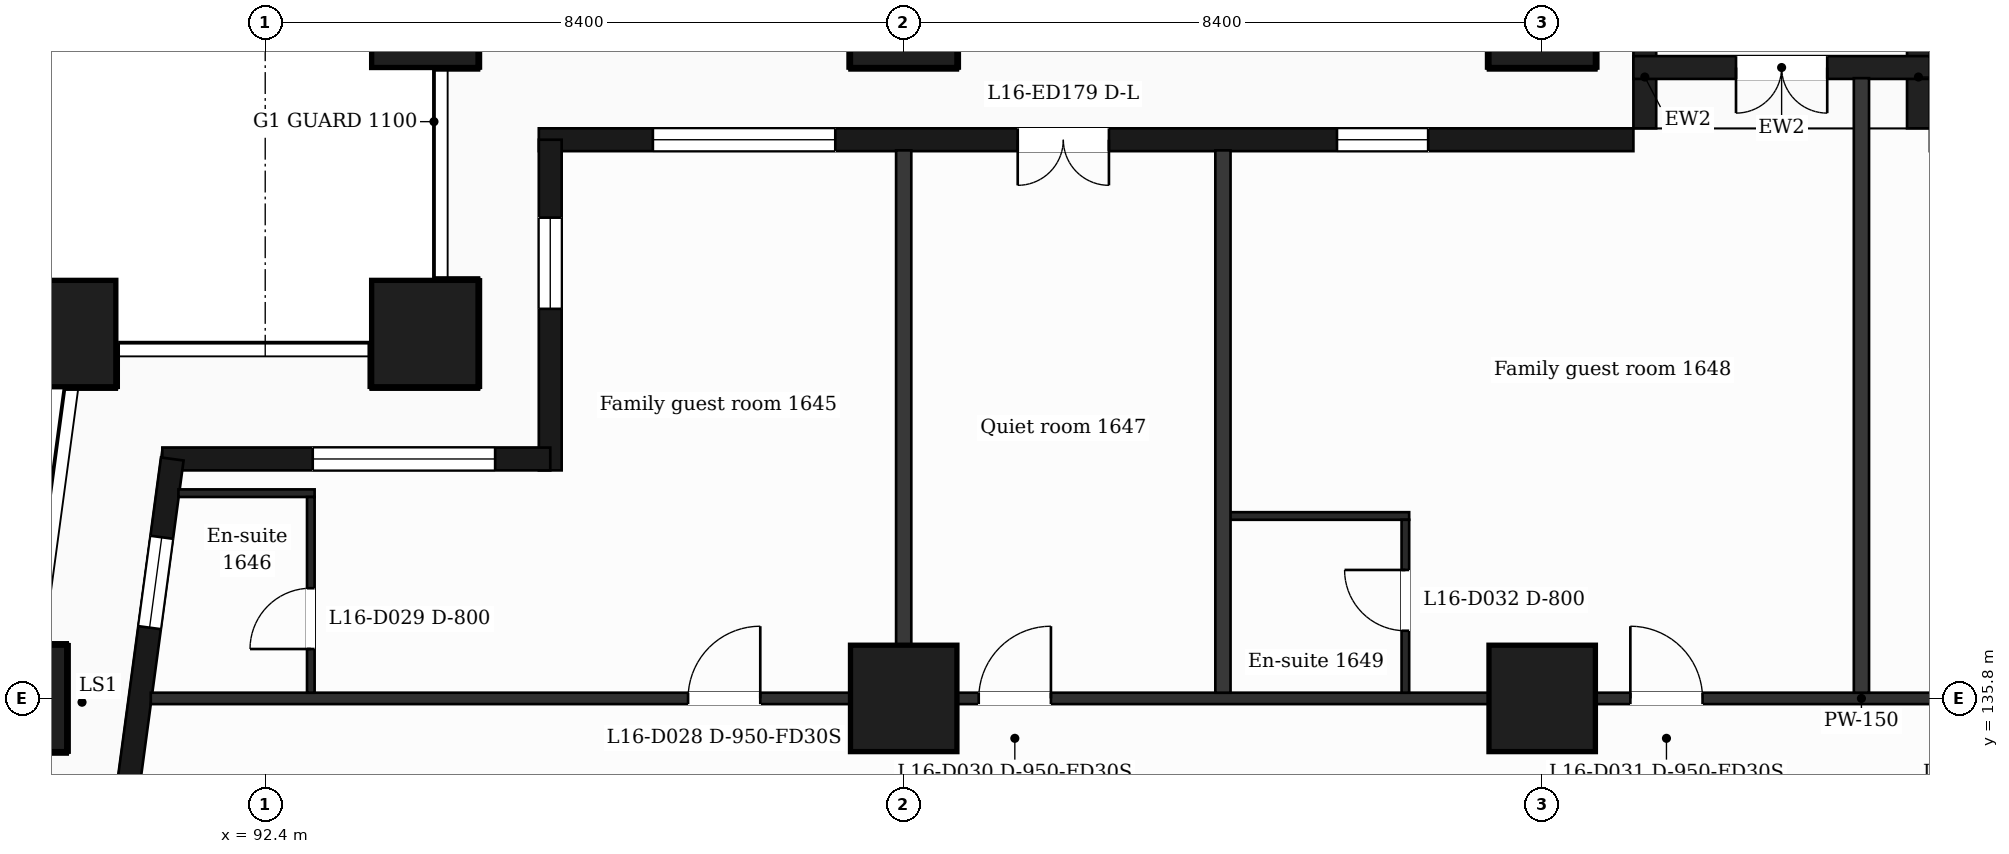
"""IFC4 building model, lengths in metres.
Left out: names, types, materials, properties, quantities, classifications, styles, units other than length and angle.
Written with IfcOpenShell. Run it as: python <this file> out.ifc"""

import sys

from ifc_helpers import new_model, si_unit, direction, frame, frame_2d, origin, origin_2d, place, context, subcontext, project, spatial, rectangle, extrude, element, fill, save


model = new_model("IFC4")
c1 = context("Model", 3, precision=1e-05, world=origin(), true_north=direction((0.0, 1.0)))
c2 = subcontext(c1, "Body", "Model", "MODEL_VIEW")
j1 = project(units=[si_unit("LENGTHUNIT", "METRE"), si_unit("PLANEANGLEUNIT", "RADIAN")], contexts=[c1])
p1 = place(None, origin())
s1 = spatial("IfcSite", under=j1, at=p1, CompositionType="ELEMENT")
p2 = place(p1, origin())
s2 = spatial("IfcBuilding", under=s1, at=p2, CompositionType="ELEMENT")
p3 = place(p2, frame((0.0, 0.0, 74.0)))
s3 = spatial("IfcBuildingStorey", under=s2, at=p3, CompositionType="ELEMENT", Elevation=74.0)
for number, where, z_axis, x_axis in (
    (1, (94.5, 140.6, 0.0), (0.0, 0.0, 1.0), (1.0, 0.0, 0.0)),
    (2, (89.735, 140.6, 0.0), (0.0, 0.0, 1.0), (1.0, 0.0, 0.0)),
    (3, (100.8, 135.8, 0.0), (0.0, 0.0, 1.0), (1.0, 0.0, 0.0)),
    (4, (109.2, 135.8, 0.0), (0.0, 0.0, 1.0), (1.0, 0.0, 0.0)),
    (5, (89.088, 135.8, 0.0), (0.0, 0.0, 1.0), (1.0, 0.0, 0.0)),
    (6, (100.8, 144.8, 0.0), (0.0, 0.0, 1.0), (1.0, 0.0, 0.0)),
    (7, (109.2, 144.8, 0.0), (0.0, 0.0, 1.0), (1.0, 0.0, 0.0)),
    (8, (94.5, 144.8, 0.0), (0.0, 0.0, 1.0), (1.0, 0.0, 0.0)),
):
    element("IfcColumn", number, at=place(p3, frame(where, z_axis=z_axis, x_axis=x_axis)), inside=s3, PredefinedType="COLUMN", context=c2, shape_type="SweptSolid", body=[
        extrude(rectangle(XDim=1.4, YDim=1.4, at=origin_2d()), origin(), (0.0, 0.0, 1.0), 3.5),
    ])
p4 = place(p3, frame((110.4, 143.15, 0.0), z_axis=(0.0, 0.0, 1.0), x_axis=(-1.0, 0.0, 0.0)))
e9 = element("IfcWall", 9, at=p4, inside=s3, PredefinedType="SOLIDWALL", context=c2, shape_type="SweptSolid", body=[
    extrude(rectangle(XDim=14.4, YDim=0.3, at=frame_2d((7.2, 0.0))), origin(), (0.0, 0.0, 1.0), 3.18),
])
p5 = place(p4, frame((2.7, 0.0, 0.9)))
e10 = element("IfcOpeningElement", 10, at=p5, cuts=e9, PredefinedType="OPENING", context=c2, shape_type="SweptSolid", body=[
    extrude(rectangle(XDim=1.2, YDim=2.1, at=frame_2d((0.6, 1.05))), frame((0.0, 0.16, 0.0), z_axis=(0.0, -1.0, 0.0), x_axis=(1.0, 0.0, 0.0)), (0.0, 0.0, 1.0), 0.32),
])
p6 = place(p4, frame((6.9, 0.0, 0.0)))
e11 = element("IfcOpeningElement", 11, at=p6, cuts=e9, PredefinedType="OPENING", context=c2, shape_type="SweptSolid", body=[
    extrude(rectangle(XDim=1.2, YDim=2.4, at=frame_2d((0.6, 1.2))), frame((0.0, 0.16, 0.0), z_axis=(0.0, -1.0, 0.0), x_axis=(1.0, 0.0, 0.0)), (0.0, 0.0, 1.0), 0.32),
])
p7 = place(p4, frame((10.5, 0.0, 0.9)))
e12 = element("IfcOpeningElement", 12, at=p7, cuts=e9, PredefinedType="OPENING", context=c2, shape_type="SweptSolid", body=[
    extrude(rectangle(XDim=2.4, YDim=2.1, at=frame_2d((1.2, 1.05))), frame((0.0, 0.16, 0.0), z_axis=(0.0, -1.0, 0.0), x_axis=(1.0, 0.0, 0.0)), (0.0, 0.0, 1.0), 0.32),
])
for number, where, z_axis, x_axis in (
    (13, (114.15, 143.3, 0.0), (0.0, 0.0, 1.0), (0.0, 1.0, 0.0)),
    (14, (110.55, 143.3, 0.0), (0.0, 0.0, 1.0), (0.0, 1.0, 0.0)),
):
    element("IfcWall", number, at=place(p3, frame(where, z_axis=z_axis, x_axis=x_axis)), inside=s3, PredefinedType="SOLIDWALL", context=c2, shape_type="SweptSolid", body=[
        extrude(rectangle(XDim=1.35, YDim=0.3, at=frame_2d((0.675, 0.0))), origin(), (0.0, 0.0, 1.0), 3.18),
    ])
p8 = place(p3, frame((114.3, 144.1, 0.0), z_axis=(0.0, 0.0, 1.0), x_axis=(-1.0, 0.0, 0.0)))
e15 = element("IfcWall", 15, at=p8, inside=s3, PredefinedType="SOLIDWALL", context=c2, shape_type="SweptSolid", body=[
    extrude(rectangle(XDim=3.9, YDim=0.3, at=frame_2d((1.95, 0.0))), origin(), (0.0, 0.0, 1.0), 3.18),
])
p9 = place(p8, frame((1.35, 0.0, 0.0)))
e16 = element("IfcOpeningElement", 16, at=p9, cuts=e15, PredefinedType="OPENING", context=c2, shape_type="SweptSolid", body=[
    extrude(rectangle(XDim=1.2, YDim=2.4, at=frame_2d((0.6, 1.2))), frame((0.0, 0.16, 0.0), z_axis=(0.0, -1.0, 0.0), x_axis=(1.0, 0.0, 0.0)), (0.0, 0.0, 1.0), 0.32),
])
p10 = place(p3, frame((96.15, 143.15, 0.0), z_axis=(0.0, 0.0, 1.0), x_axis=(0.0, -1.0, 0.0)))
e17 = element("IfcWall", 17, at=p10, inside=s3, PredefinedType="SOLIDWALL", context=c2, shape_type="SweptSolid", body=[
    extrude(rectangle(XDim=4.35, YDim=0.3, at=frame_2d((2.175, 0.0))), origin(), (0.0, 0.0, 1.0), 3.18),
])
p11 = place(p10, frame((1.025, 0.0, 0.9)))
e18 = element("IfcOpeningElement", 18, at=p11, cuts=e17, PredefinedType="OPENING", context=c2, shape_type="SweptSolid", body=[
    extrude(rectangle(XDim=1.2, YDim=2.1, at=frame_2d((0.6, 1.05))), frame((0.0, 0.16, 0.0), z_axis=(0.0, -1.0, 0.0), x_axis=(1.0, 0.0, 0.0)), (0.0, 0.0, 1.0), 0.32),
])
p12 = place(p3, frame((96.15, 138.95, 0.0), z_axis=(0.0, 0.0, 1.0), x_axis=(-1.0, 0.0, 0.0)))
e19 = element("IfcWall", 19, at=p12, inside=s3, PredefinedType="SOLIDWALL", context=c2, shape_type="SweptSolid", body=[
    extrude(rectangle(XDim=5.104, YDim=0.3, at=frame_2d((2.552, 0.0))), origin(), (0.0, 0.0, 1.0), 3.18),
])
p13 = place(p12, frame((0.725, 0.0, 0.9)))
e20 = element("IfcOpeningElement", 20, at=p13, cuts=e19, PredefinedType="OPENING", context=c2, shape_type="SweptSolid", body=[
    extrude(rectangle(XDim=2.4, YDim=2.1, at=frame_2d((1.2, 1.05))), frame((0.0, 0.16, 0.0), z_axis=(0.0, -1.0, 0.0), x_axis=(1.0, 0.0, 0.0)), (0.0, 0.0, 1.0), 0.32),
])
p14 = place(p3, frame((91.177, 138.95, 0.0), z_axis=(0.0, 0.0, 1.0), x_axis=(-0.133426664613, -0.991058689065, 0.0)))
e21 = element("IfcWall", 21, at=p14, inside=s3, PredefinedType="SOLIDWALL", context=c2, shape_type="SweptSolid", body=[
    extrude(rectangle(XDim=6.609, YDim=0.3, at=frame_2d((3.305, 0.0))), origin(), (0.0, 0.0, 1.0), 3.18),
])
p15 = place(p14, frame((1.039, 0.0, 0.9)))
e22 = element("IfcOpeningElement", 22, at=p15, cuts=e21, PredefinedType="OPENING", context=c2, shape_type="SweptSolid", body=[
    extrude(rectangle(XDim=1.2, YDim=2.1, at=frame_2d((0.6, 1.05))), frame((0.0, 0.16, 0.0), z_axis=(0.0, -1.0, 0.0), x_axis=(1.0, 0.0, 0.0)), (0.0, 0.0, 1.0), 0.32),
])
p16 = place(p14, frame((4.294, 0.0, 0.0)))
e23 = element("IfcOpeningElement", 23, at=p16, cuts=e21, PredefinedType="OPENING", context=c2, shape_type="SweptSolid", body=[
    extrude(rectangle(XDim=1.2, YDim=2.4, at=frame_2d((0.6, 1.2))), frame((0.0, 0.16, 0.0), z_axis=(0.0, -1.0, 0.0), x_axis=(1.0, 0.0, 0.0)), (0.0, 0.0, 1.0), 0.32),
])
p17 = place(p3, frame((90.895, 135.8, 0.0), z_axis=(0.0, 0.0, 1.0), x_axis=(1.0, 0.0, 0.0)))
e24 = element("IfcWall", 24, at=p17, inside=s3, PredefinedType="PARTITIONING", context=c2, shape_type="SweptSolid", body=[
    extrude(rectangle(XDim=45.011, YDim=0.15, at=frame_2d((22.505, 0.0))), origin(), (0.0, 0.0, 1.0), 3.18),
])
p18 = place(p17, frame((7.068, 0.0, 0.0)))
e25 = element("IfcOpeningElement", 25, at=p18, cuts=e24, PredefinedType="OPENING", context=c2, shape_type="SweptSolid", body=[
    extrude(rectangle(XDim=0.95, YDim=2.1, at=frame_2d((0.475, 1.05))), frame((0.0, 0.085, 0.0), z_axis=(0.0, -1.0, 0.0), x_axis=(1.0, 0.0, 0.0)), (0.0, 0.0, 1.0), 0.17),
])
p19 = place(p17, frame((10.892, 0.0, 0.0)))
e26 = element("IfcOpeningElement", 26, at=p19, cuts=e24, PredefinedType="OPENING", context=c2, shape_type="SweptSolid", body=[
    extrude(rectangle(XDim=0.95, YDim=2.1, at=frame_2d((0.475, 1.05))), frame((0.0, 0.085, 0.0), z_axis=(0.0, -1.0, 0.0), x_axis=(1.0, 0.0, 0.0)), (0.0, 0.0, 1.0), 0.17),
])
p20 = place(p17, frame((19.465, 0.0, 0.0)))
e27 = element("IfcOpeningElement", 27, at=p20, cuts=e24, PredefinedType="OPENING", context=c2, shape_type="SweptSolid", body=[
    extrude(rectangle(XDim=0.95, YDim=2.1, at=frame_2d((0.475, 1.05))), frame((0.0, 0.085, 0.0), z_axis=(0.0, -1.0, 0.0), x_axis=(1.0, 0.0, 0.0)), (0.0, 0.0, 1.0), 0.17),
])
p21 = place(p17, frame((24.385, 0.0, 0.0)))
e28 = element("IfcOpeningElement", 28, at=p21, cuts=e24, PredefinedType="OPENING", context=c2, shape_type="SweptSolid", body=[
    extrude(rectangle(XDim=0.95, YDim=2.1, at=frame_2d((0.475, 1.05))), frame((0.0, 0.085, 0.0), z_axis=(0.0, -1.0, 0.0), x_axis=(1.0, 0.0, 0.0)), (0.0, 0.0, 1.0), 0.17),
])
p22 = place(p17, frame((30.767, 0.0, 0.0)))
e29 = element("IfcOpeningElement", 29, at=p22, cuts=e24, PredefinedType="OPENING", context=c2, shape_type="SweptSolid", body=[
    extrude(rectangle(XDim=0.95, YDim=2.1, at=frame_2d((0.475, 1.05))), frame((0.0, 0.085, 0.0), z_axis=(0.0, -1.0, 0.0), x_axis=(1.0, 0.0, 0.0)), (0.0, 0.0, 1.0), 0.17),
])
p23 = place(p17, frame((40.314, 0.0, 0.0)))
e30 = element("IfcOpeningElement", 30, at=p23, cuts=e24, PredefinedType="OPENING", context=c2, shape_type="SweptSolid", body=[
    extrude(rectangle(XDim=0.95, YDim=2.1, at=frame_2d((0.475, 1.05))), frame((0.0, 0.085, 0.0), z_axis=(0.0, -1.0, 0.0), x_axis=(1.0, 0.0, 0.0)), (0.0, 0.0, 1.0), 0.17),
])
p24 = place(p3, frame((105.0, 138.2, 0.0), z_axis=(0.0, 0.0, 1.0), x_axis=(1.0, 0.0, 0.0)))
e31 = element("IfcWall", 31, at=p24, inside=s3, PredefinedType="PARTITIONING", context=c2, shape_type="SweptSolid", body=[
    extrude(rectangle(XDim=2.45, YDim=0.1, at=frame_2d((1.225, 0.0))), origin(), (0.0, 0.0, 1.0), 3.18),
])
p25 = place(p3, frame((91.258, 138.5, 0.0), z_axis=(0.0, 0.0, 1.0), x_axis=(1.0, 0.0, 0.0)))
e32 = element("IfcWall", 32, at=p25, inside=s3, PredefinedType="PARTITIONING", context=c2, shape_type="SweptSolid", body=[
    extrude(rectangle(XDim=1.792, YDim=0.1, at=frame_2d((0.896, 0.0))), origin(), (0.0, 0.0, 1.0), 3.18),
])
p26 = place(p3, frame((93.0, 135.875, 0.0), z_axis=(0.0, 0.0, 1.0), x_axis=(0.0, 1.0, 0.0)))
e33 = element("IfcWall", 33, at=p26, inside=s3, PredefinedType="PARTITIONING", context=c2, shape_type="SweptSolid", body=[
    extrude(rectangle(XDim=2.575, YDim=0.1, at=frame_2d((1.288, 0.0))), origin(), (0.0, 0.0, 1.0), 3.18),
])
p27 = place(p26, frame((0.575, 0.0, 0.0)))
e34 = element("IfcOpeningElement", 34, at=p27, cuts=e33, PredefinedType="OPENING", context=c2, shape_type="SweptSolid", body=[
    extrude(rectangle(XDim=0.8, YDim=2.1, at=frame_2d((0.4, 1.05))), frame((0.0, 0.06, 0.0), z_axis=(0.0, -1.0, 0.0), x_axis=(1.0, 0.0, 0.0)), (0.0, 0.0, 1.0), 0.12),
])
for number, where, z_axis, x_axis in (
    (35, (100.8, 135.875, 0.0), (0.0, 0.0, 1.0), (0.0, 1.0, 0.0)),
    (36, (105.0, 135.875, 0.0), (0.0, 0.0, 1.0), (0.0, 1.0, 0.0)),
):
    element("IfcWall", number, at=place(p3, frame(where, z_axis=z_axis, x_axis=x_axis)), inside=s3, PredefinedType="PARTITIONING", context=c2, shape_type="SweptSolid", body=[
        extrude(rectangle(XDim=7.135, YDim=0.2, at=frame_2d((3.567, 0.0))), origin(), (0.0, 0.0, 1.0), 3.18),
    ])
p28 = place(p3, frame((107.4, 135.875, 0.0), z_axis=(0.0, 0.0, 1.0), x_axis=(0.0, 1.0, 0.0)))
e37 = element("IfcWall", 37, at=p28, inside=s3, PredefinedType="PARTITIONING", context=c2, shape_type="SweptSolid", body=[
    extrude(rectangle(XDim=2.275, YDim=0.1, at=frame_2d((1.137, 0.0))), origin(), (0.0, 0.0, 1.0), 3.18),
])
p29 = place(p28, frame((0.815, 0.0, 0.0)))
e38 = element("IfcOpeningElement", 38, at=p29, cuts=e37, PredefinedType="OPENING", context=c2, shape_type="SweptSolid", body=[
    extrude(rectangle(XDim=0.8, YDim=2.1, at=frame_2d((0.4, 1.05))), frame((0.0, 0.06, 0.0), z_axis=(0.0, -1.0, 0.0), x_axis=(1.0, 0.0, 0.0)), (0.0, 0.0, 1.0), 0.12),
])
p30 = place(p3, frame((113.4, 135.875, 0.0), z_axis=(0.0, 0.0, 1.0), x_axis=(0.0, 1.0, 0.0)))
e39 = element("IfcWall", 39, at=p30, inside=s3, PredefinedType="PARTITIONING", context=c2, shape_type="SweptSolid", body=[
    extrude(rectangle(XDim=8.085, YDim=0.2, at=frame_2d((4.042, 0.0))), origin(), (0.0, 0.0, 1.0), 3.18),
])
p31 = place(p5, origin())
e40 = element("IfcWindow", 40, at=p31, inside=s3, PartitioningType="SINGLE_PANEL", PredefinedType="WINDOW", context=c2, shape_type="SweptSolid", body=[
    extrude(rectangle(XDim=1.2, YDim=2.1, at=frame_2d((0.6, 1.05))), frame((0.0, 0.03, 0.0), z_axis=(0.0, -1.0, 0.0), x_axis=(1.0, 0.0, 0.0)), (0.0, 0.0, 1.0), 0.06),
])
fill(e10, e40)
p32 = place(p6, origin())
e41 = element("IfcDoor", 41, at=p32, inside=s3, OperationType="DOUBLE_DOOR_SINGLE_SWING", PredefinedType="DOOR", context=c2, shape_type="SweptSolid", body=[
    extrude(rectangle(XDim=1.2, YDim=2.4, at=frame_2d((0.6, 1.2))), frame((0.0, 0.025, 0.0), z_axis=(0.0, -1.0, 0.0), x_axis=(1.0, 0.0, 0.0)), (0.0, 0.0, 1.0), 0.05),
])
fill(e11, e41)
p33 = place(p7, origin())
e42 = element("IfcWindow", 42, at=p33, inside=s3, PartitioningType="SINGLE_PANEL", PredefinedType="WINDOW", context=c2, shape_type="SweptSolid", body=[
    extrude(rectangle(XDim=2.4, YDim=2.1, at=frame_2d((1.2, 1.05))), frame((0.0, 0.03, 0.0), z_axis=(0.0, -1.0, 0.0), x_axis=(1.0, 0.0, 0.0)), (0.0, 0.0, 1.0), 0.06),
])
fill(e12, e42)
p34 = place(p9, origin())
e43 = element("IfcDoor", 43, at=p34, inside=s3, OperationType="DOUBLE_DOOR_SINGLE_SWING", PredefinedType="DOOR", context=c2, shape_type="SweptSolid", body=[
    extrude(rectangle(XDim=1.2, YDim=2.4, at=frame_2d((0.6, 1.2))), frame((0.0, 0.025, 0.0), z_axis=(0.0, -1.0, 0.0), x_axis=(1.0, 0.0, 0.0)), (0.0, 0.0, 1.0), 0.05),
])
fill(e16, e43)
p35 = place(p11, origin())
e44 = element("IfcWindow", 44, at=p35, inside=s3, PartitioningType="SINGLE_PANEL", PredefinedType="WINDOW", context=c2, shape_type="SweptSolid", body=[
    extrude(rectangle(XDim=1.2, YDim=2.1, at=frame_2d((0.6, 1.05))), frame((0.0, 0.03, 0.0), z_axis=(0.0, -1.0, 0.0), x_axis=(1.0, 0.0, 0.0)), (0.0, 0.0, 1.0), 0.06),
])
fill(e18, e44)
p36 = place(p13, origin())
e45 = element("IfcWindow", 45, at=p36, inside=s3, PartitioningType="SINGLE_PANEL", PredefinedType="WINDOW", context=c2, shape_type="SweptSolid", body=[
    extrude(rectangle(XDim=2.4, YDim=2.1, at=frame_2d((1.2, 1.05))), frame((0.0, 0.03, 0.0), z_axis=(0.0, -1.0, 0.0), x_axis=(1.0, 0.0, 0.0)), (0.0, 0.0, 1.0), 0.06),
])
fill(e20, e45)
p37 = place(p15, origin())
e46 = element("IfcWindow", 46, at=p37, inside=s3, PartitioningType="SINGLE_PANEL", PredefinedType="WINDOW", context=c2, shape_type="SweptSolid", body=[
    extrude(rectangle(XDim=1.2, YDim=2.1, at=frame_2d((0.6, 1.05))), frame((0.0, 0.03, 0.0), z_axis=(0.0, -1.0, 0.0), x_axis=(1.0, 0.0, 0.0)), (0.0, 0.0, 1.0), 0.06),
])
fill(e22, e46)
p38 = place(p18, origin())
e47 = element("IfcDoor", 47, at=p38, inside=s3, OperationType="SINGLE_SWING_RIGHT", PredefinedType="DOOR", context=c2, shape_type="SweptSolid", body=[
    extrude(rectangle(XDim=0.95, YDim=2.1, at=frame_2d((0.475, 1.05))), frame((0.0, 0.025, 0.0), z_axis=(0.0, -1.0, 0.0), x_axis=(1.0, 0.0, 0.0)), (0.0, 0.0, 1.0), 0.05),
])
fill(e25, e47)
p39 = place(p27, origin())
e48 = element("IfcDoor", 48, at=p39, inside=s3, OperationType="SINGLE_SWING_LEFT", PredefinedType="DOOR", context=c2, shape_type="SweptSolid", body=[
    extrude(rectangle(XDim=0.8, YDim=2.1, at=frame_2d((0.4, 1.05))), frame((0.0, 0.025, 0.0), z_axis=(0.0, -1.0, 0.0), x_axis=(1.0, 0.0, 0.0)), (0.0, 0.0, 1.0), 0.05),
])
fill(e34, e48)
p40 = place(p19, origin())
e49 = element("IfcDoor", 49, at=p40, inside=s3, OperationType="SINGLE_SWING_RIGHT", PredefinedType="DOOR", context=c2, shape_type="SweptSolid", body=[
    extrude(rectangle(XDim=0.95, YDim=2.1, at=frame_2d((0.475, 1.05))), frame((0.0, 0.025, 0.0), z_axis=(0.0, -1.0, 0.0), x_axis=(1.0, 0.0, 0.0)), (0.0, 0.0, 1.0), 0.05),
])
fill(e26, e49)
p41 = place(p20, origin())
e50 = element("IfcDoor", 50, at=p41, inside=s3, OperationType="SINGLE_SWING_LEFT", PredefinedType="DOOR", context=c2, shape_type="SweptSolid", body=[
    extrude(rectangle(XDim=0.95, YDim=2.1, at=frame_2d((0.475, 1.05))), frame((0.0, 0.025, 0.0), z_axis=(0.0, -1.0, 0.0), x_axis=(1.0, 0.0, 0.0)), (0.0, 0.0, 1.0), 0.05),
])
fill(e27, e50)
p42 = place(p29, origin())
e51 = element("IfcDoor", 51, at=p42, inside=s3, OperationType="SINGLE_SWING_RIGHT", PredefinedType="DOOR", context=c2, shape_type="SweptSolid", body=[
    extrude(rectangle(XDim=0.8, YDim=2.1, at=frame_2d((0.4, 1.05))), frame((0.0, 0.025, 0.0), z_axis=(0.0, -1.0, 0.0), x_axis=(1.0, 0.0, 0.0)), (0.0, 0.0, 1.0), 0.05),
])
fill(e38, e51)
save(model, sys.argv[1])
